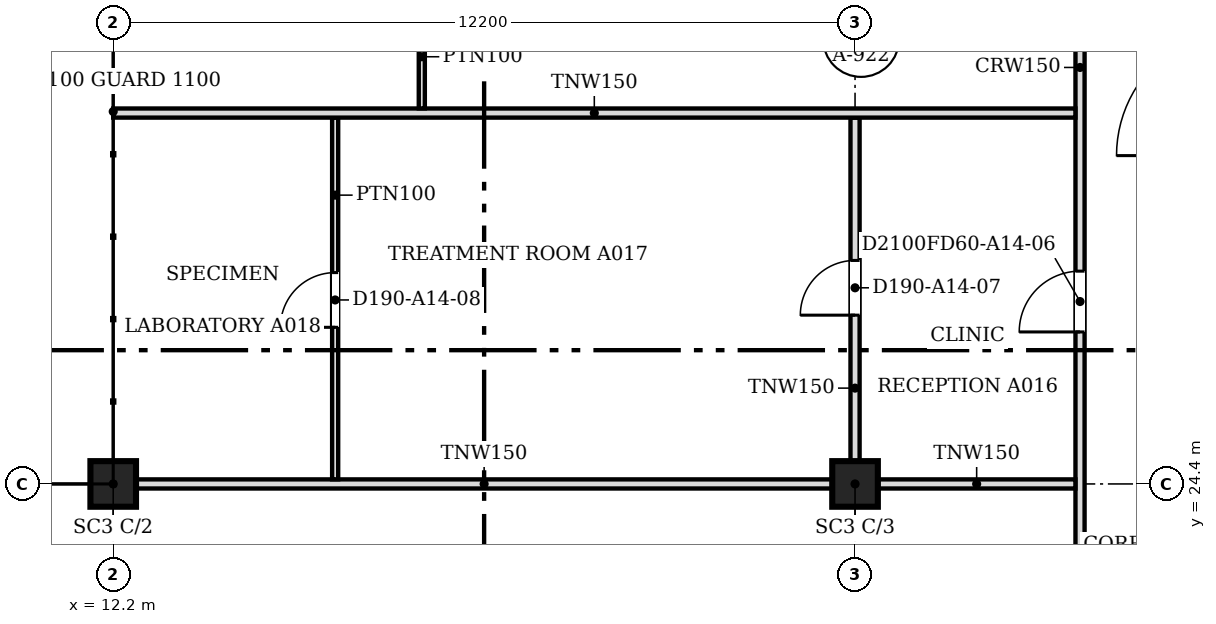
"""IFC4 building model, lengths in metres.
Left out: names, types, materials, properties, quantities, classifications, styles, units other than length and angle.
Written with IfcOpenShell. Run it as: python <this file> out.ifc"""

import sys

from ifc_helpers import new_model, si_unit, direction, frame, frame_2d, origin, origin_2d, place, context, subcontext, project, spatial, rectangle, extrude, source, transform, mapped, element, fill, save


model = new_model("IFC4")
c1 = context("Model", 3, precision=1e-05, world=origin(), true_north=direction((0.0, 1.0)))
c2 = subcontext(c1, "Body", "Model", "MODEL_VIEW")
j1 = project(units=[si_unit("LENGTHUNIT", "METRE"), si_unit("PLANEANGLEUNIT", "RADIAN")], contexts=[c1])
p1 = place(None, origin())
s1 = spatial("IfcSite", under=j1, at=p1, CompositionType="ELEMENT")
p2 = place(p1, origin())
s2 = spatial("IfcBuilding", under=s1, at=p2, CompositionType="ELEMENT")
p3 = place(p2, frame((0.0, 0.0, 155.4)))
s3 = spatial("IfcBuildingStorey", under=s2, at=p3, CompositionType="ELEMENT", Elevation=155.4)
for number, where, z_axis, x_axis in (
    (1, (12.2, 24.4, 0.0), (0.0, 0.0, 1.0), (1.0, 0.0, 0.0)),
    (2, (24.4, 24.4, 0.0), (0.0, 0.0, 1.0), (1.0, 0.0, 0.0)),
):
    element("IfcColumn", number, at=place(p3, frame(where, z_axis=z_axis, x_axis=x_axis)), inside=s3, PredefinedType="COLUMN", context=c2, shape_type="SweptSolid", body=[
        extrude(rectangle(XDim=0.75, YDim=0.75, at=origin_2d()), origin(), (0.0, 0.0, 1.0), 3.6),
    ])
p4 = place(p3, frame((28.1, 18.8, 0.0), z_axis=(0.0, 0.0, 1.0), x_axis=(0.0, 1.0, 0.0)))
e3 = element("IfcWall", 3, at=p4, inside=s3, PredefinedType="PARTITIONING", context=c2, shape_type="SweptSolid", body=[
    extrude(rectangle(XDim=26.5, YDim=0.15, at=frame_2d((13.25, 0.0))), origin(), (0.0, 0.0, 1.0), 3.067),
])
m1 = source(origin(), c2, "Body", "SweptSolid", [
    extrude(rectangle(XDim=0.9, YDim=2.1, at=frame_2d((0.45, 1.05))), frame((0.0, 0.085, 0.0), z_axis=(0.0, -1.0, 0.0), x_axis=(1.0, 0.0, 0.0)), (0.0, 0.0, 1.0), 0.17),
])
p5 = place(p4, frame((1.1, 0.0, 0.0)))
e4 = element("IfcOpeningElement", 4, at=p5, cuts=e3, PredefinedType="OPENING", context=c2, shape_type="MappedRepresentation", body=[
    mapped(m1, transform((0.0, 0.0, 0.0), scale=1.0)),
])
m2 = source(origin(), c2, "Body", "SweptSolid", [
    extrude(rectangle(XDim=1.0, YDim=2.1, at=frame_2d((0.5, 1.05))), frame((0.0, 0.085, 0.0), z_axis=(0.0, -1.0, 0.0), x_axis=(1.0, 0.0, 0.0)), (0.0, 0.0, 1.0), 0.17),
])
p6 = place(p4, frame((23.151, 0.0, 0.0)))
e5 = element("IfcOpeningElement", 5, at=p6, cuts=e3, PredefinedType="OPENING", context=c2, shape_type="MappedRepresentation", body=[
    mapped(m2, transform((0.0, 0.0, 0.0), scale=1.0)),
])
p7 = place(p4, frame((8.1, 0.0, 0.0)))
e6 = element("IfcOpeningElement", 6, at=p7, cuts=e3, PredefinedType="OPENING", context=c2, shape_type="MappedRepresentation", body=[
    mapped(m2, transform((0.0, 0.0, 0.0), scale=1.0)),
])
p8 = place(p4, frame((15.8, 0.0, 0.0)))
e7 = element("IfcOpeningElement", 7, at=p8, cuts=e3, PredefinedType="OPENING", context=c2, shape_type="MappedRepresentation", body=[
    mapped(m1, transform((0.0, 0.0, 0.0), scale=1.0)),
])
p9 = place(p3, frame((12.576, 24.4, 0.0), z_axis=(0.0, 0.0, 1.0), x_axis=(1.0, 0.0, 0.0)))
e8 = element("IfcWall", 8, at=p9, inside=s3, PredefinedType="PARTITIONING", context=c2, shape_type="SweptSolid", body=[
    extrude(rectangle(XDim=11.448, YDim=0.15, at=frame_2d((5.724, 0.0))), origin(), (0.0, 0.0, 1.0), 3.067),
])
p10 = place(p3, frame((24.776, 24.4, 0.0), z_axis=(0.0, 0.0, 1.0), x_axis=(1.0, 0.0, 0.0)))
e9 = element("IfcWall", 9, at=p10, inside=s3, PredefinedType="PARTITIONING", context=c2, shape_type="SweptSolid", body=[
    extrude(rectangle(XDim=3.248, YDim=0.15, at=frame_2d((1.624, 0.0))), origin(), (0.0, 0.0, 1.0), 3.067),
])
p11 = place(p3, frame((15.85, 24.476, 0.0), z_axis=(0.0, 0.0, 1.0), x_axis=(0.0, 1.0, 0.0)))
e10 = element("IfcWall", 10, at=p11, inside=s3, PredefinedType="PARTITIONING", context=c2, shape_type="SweptSolid", body=[
    extrude(rectangle(XDim=5.948, YDim=0.1, at=frame_2d((2.974, 0.0))), origin(), (0.0, 0.0, 1.0), 3.067),
])
m3 = source(origin(), c2, "Body", "SweptSolid", [
    extrude(rectangle(XDim=0.9, YDim=2.1, at=frame_2d((0.45, 1.05))), frame((0.0, 0.06, 0.0), z_axis=(0.0, -1.0, 0.0), x_axis=(1.0, 0.0, 0.0)), (0.0, 0.0, 1.0), 0.12),
])
p12 = place(p11, frame((2.5, 0.0, 0.0)))
e11 = element("IfcOpeningElement", 11, at=p12, cuts=e10, PredefinedType="OPENING", context=c2, shape_type="MappedRepresentation", body=[
    mapped(m3, transform((0.0, 0.0, 0.0), scale=1.0)),
])
p13 = place(p3, frame((24.4, 24.776, 0.0), z_axis=(0.0, 0.0, 1.0), x_axis=(0.0, 1.0, 0.0)))
e12 = element("IfcWall", 12, at=p13, inside=s3, PredefinedType="PARTITIONING", context=c2, shape_type="SweptSolid", body=[
    extrude(rectangle(XDim=5.648, YDim=0.15, at=frame_2d((2.824, 0.0))), origin(), (0.0, 0.0, 1.0), 3.067),
])
p14 = place(p13, frame((2.4, 0.0, 0.0)))
e13 = element("IfcOpeningElement", 13, at=p14, cuts=e12, PredefinedType="OPENING", context=c2, shape_type="MappedRepresentation", body=[
    mapped(m1, transform((0.0, 0.0, 0.0), scale=1.0)),
])
p15 = place(p3, frame((12.2, 30.5, 0.0), z_axis=(0.0, 0.0, 1.0), x_axis=(1.0, 0.0, 0.0)))
e14 = element("IfcWall", 14, at=p15, inside=s3, PredefinedType="PARTITIONING", context=c2, shape_type="SweptSolid", body=[
    extrude(rectangle(XDim=15.824, YDim=0.15, at=frame_2d((7.912, 0.0))), origin(), (0.0, 0.0, 1.0), 3.067),
])
p16 = place(p3, frame((17.275, 30.576, 0.0), z_axis=(0.0, 0.0, 1.0), x_axis=(0.0, 1.0, 0.0)))
e15 = element("IfcWall", 15, at=p16, inside=s3, PredefinedType="PARTITIONING", context=c2, shape_type="SweptSolid", body=[
    extrude(rectangle(XDim=4.293, YDim=0.1, at=frame_2d((2.147, 0.0))), origin(), (0.0, 0.0, 1.0), 3.067),
])
p17 = place(p16, frame((1.7, 0.0, 0.0)))
e16 = element("IfcOpeningElement", 16, at=p17, cuts=e15, PredefinedType="OPENING", context=c2, shape_type="MappedRepresentation", body=[
    mapped(m3, transform((0.0, 0.0, 0.0), scale=1.0)),
])
m4 = source(origin(), c2, "Body", "SweptSolid", [
    extrude(rectangle(XDim=0.9, YDim=2.1, at=frame_2d((0.45, 1.05))), frame((0.0, 0.025, 0.0), z_axis=(0.0, -1.0, 0.0), x_axis=(1.0, 0.0, 0.0)), (0.0, 0.0, 1.0), 0.05),
])
p18 = place(p14, origin())
e17 = element("IfcDoor", 17, at=p18, inside=s3, OperationType="SINGLE_SWING_LEFT", PredefinedType="DOOR", context=c2, shape_type="MappedRepresentation", body=[
    mapped(m4, transform((0.0, 0.0, 0.0), scale=1.0)),
])
fill(e13, e17)
p19 = place(p12, origin())
e18 = element("IfcDoor", 18, at=p19, inside=s3, OperationType="SINGLE_SWING_LEFT", PredefinedType="DOOR", context=c2, shape_type="MappedRepresentation", body=[
    mapped(m4, transform((0.0, 0.0, 0.0), scale=1.0)),
])
fill(e11, e18)
m5 = source(origin(), c2, "Body", "SweptSolid", [
    extrude(rectangle(XDim=1.0, YDim=2.1, at=frame_2d((0.5, 1.05))), frame((0.0, 0.025, 0.0), z_axis=(0.0, -1.0, 0.0), x_axis=(1.0, 0.0, 0.0)), (0.0, 0.0, 1.0), 0.05),
])
p20 = place(p7, origin())
e19 = element("IfcDoor", 19, at=p20, inside=s3, OperationType="SINGLE_SWING_LEFT", PredefinedType="DOOR", context=c2, shape_type="MappedRepresentation", body=[
    mapped(m5, transform((0.0, 0.0, 0.0), scale=1.0)),
])
fill(e6, e19)
save(model, sys.argv[1])
